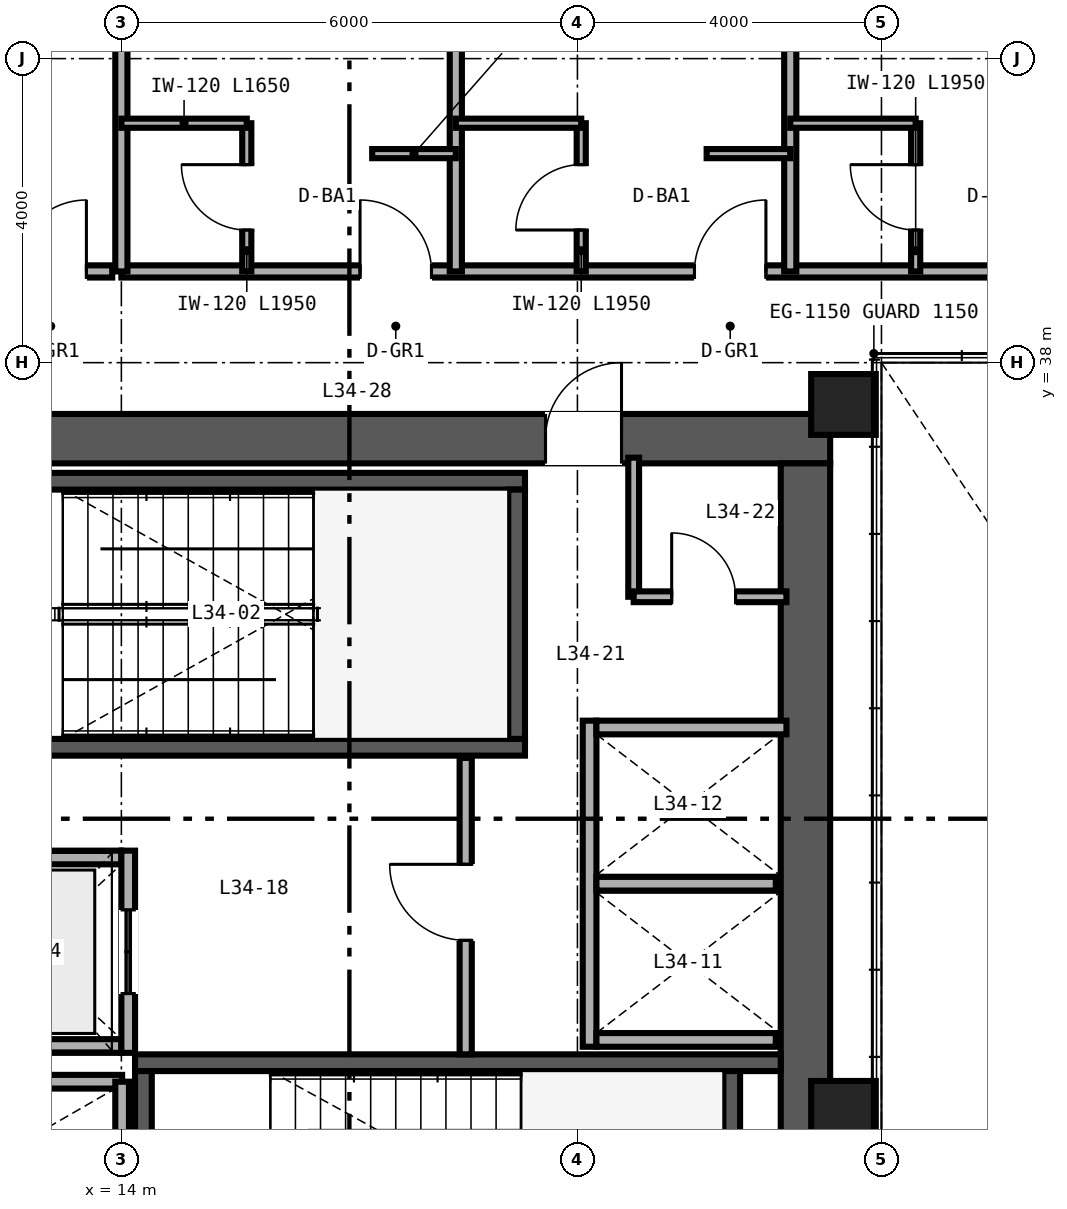
"""IFC4 building model, lengths in metres.
Left out: names, types, materials, properties, quantities, classifications, styles, units other than length and angle.
Written with IfcOpenShell. Run it as: python <this file> out.ifc"""

import sys

from ifc_helpers import new_model, si_unit, direction, frame, frame_2d, origin, origin_2d, place, context, subcontext, project, spatial, rectangle, hollow_rectangle, extrude, source, transform, mapped, element, fill, save


model = new_model("IFC4")
c1 = context("Model", 3, precision=1e-05, world=origin(), true_north=direction((0.0, 1.0)))
c2 = subcontext(c1, "Body", "Model", "MODEL_VIEW")
j1 = project(units=[si_unit("LENGTHUNIT", "METRE"), si_unit("PLANEANGLEUNIT", "RADIAN")], contexts=[c1])
p1 = place(None, origin())
s1 = spatial("IfcSite", under=j1, at=p1, CompositionType="ELEMENT")
p2 = place(p1, origin())
s2 = spatial("IfcBuilding", under=s1, at=p2, CompositionType="ELEMENT")
p3 = place(p2, frame((0.0, 0.0, 136.8)))
s3 = spatial("IfcBuildingStorey", under=s2, at=p3, CompositionType="ELEMENT", Elevation=136.8)
p4 = place(p3, frame((10.675, 37.0, 0.0), z_axis=(0.0, 0.0, 1.0), x_axis=(1.0, 0.0, 0.0)))
e1 = element("IfcWall", 1, at=p4, inside=s3, PredefinedType="SHEAR", context=c2, shape_type="SweptSolid", body=[
    extrude(rectangle(XDim=12.65, YDim=0.65, at=frame_2d((6.325, 0.0))), origin(), (0.0, 0.0, 1.0), 3.36),
])
p5 = place(p4, frame((8.905, 0.0, 0.0)))
e2 = element("IfcOpeningElement", 2, at=p5, cuts=e1, PredefinedType="OPENING", context=c2, shape_type="SweptSolid", body=[
    extrude(rectangle(XDim=1.0, YDim=2.15, at=frame_2d((0.5, 1.075))), frame((0.0, 0.335, 0.0), z_axis=(0.0, -1.0, 0.0), x_axis=(1.0, 0.0, 0.0)), (0.0, 0.0, 1.0), 0.67),
])
p6 = place(p3, frame((23.0, 15.325, 0.0), z_axis=(0.0, 0.0, 1.0), x_axis=(0.0, 1.0, 0.0)))
e3 = element("IfcWall", 3, at=p6, inside=s3, PredefinedType="SHEAR", context=c2, shape_type="SweptSolid", body=[
    extrude(rectangle(XDim=21.35, YDim=0.65, at=frame_2d((10.675, 0.0))), origin(), (0.0, 0.0, 1.0), 3.36),
])
p7 = place(p3, frame((11.325, 32.94, 0.0), z_axis=(0.0, 0.0, 1.0), x_axis=(1.0, 0.0, 0.0)))
e4 = element("IfcWall", 4, at=p7, inside=s3, PredefinedType="SHEAR", context=c2, shape_type="SweptSolid", body=[
    extrude(rectangle(XDim=7.985, YDim=0.22, at=frame_2d((3.993, 0.0))), origin(), (0.0, 0.0, 1.0), 3.4),
])
p8 = place(p7, frame((0.595, 0.0, 0.0)))
e5 = element("IfcOpeningElement", 5, at=p8, cuts=e4, PredefinedType="OPENING", context=c2, shape_type="SweptSolid", body=[
    extrude(rectangle(XDim=1.05, YDim=2.15, at=frame_2d((0.525, 1.075))), frame((0.0, 0.12, 0.0), z_axis=(0.0, -1.0, 0.0), x_axis=(1.0, 0.0, 0.0)), (0.0, 0.0, 1.0), 0.24),
])
p9 = place(p3, frame((11.325, 36.44, 0.0), z_axis=(0.0, 0.0, 1.0), x_axis=(1.0, 0.0, 0.0)))
e6 = element("IfcWall", 6, at=p9, inside=s3, PredefinedType="SHEAR", context=c2, shape_type="SweptSolid", body=[
    extrude(rectangle(XDim=7.985, YDim=0.22, at=frame_2d((3.993, 0.0))), origin(), (0.0, 0.0, 1.0), 3.4),
])
p10 = place(p3, frame((19.2, 33.05, 0.0), z_axis=(0.0, 0.0, 1.0), x_axis=(0.0, 1.0, 0.0)))
e7 = element("IfcWall", 7, at=p10, inside=s3, PredefinedType="SHEAR", context=c2, shape_type="SweptSolid", body=[
    extrude(rectangle(XDim=3.28, YDim=0.22, at=frame_2d((1.64, 0.0))), origin(), (0.0, 0.0, 1.0), 3.4),
])
p11 = place(p3, frame((14.18, 28.79, 0.0), z_axis=(0.0, 0.0, 1.0), x_axis=(1.0, 0.0, 0.0)))
e8 = element("IfcWall", 8, at=p11, inside=s3, PredefinedType="SHEAR", context=c2, shape_type="SweptSolid", body=[
    extrude(rectangle(XDim=8.495, YDim=0.22, at=frame_2d((4.248, 0.0))), origin(), (0.0, 0.0, 1.0), 3.4),
])
for number, where, z_axis, x_axis in (
    (9, (14.29, 25.4, 0.0), (0.0, 0.0, 1.0), (0.0, 1.0, 0.0)),
    (10, (22.03, 25.4, 0.0), (0.0, 0.0, 1.0), (0.0, 1.0, 0.0)),
):
    element("IfcWall", number, at=place(p3, frame(where, z_axis=z_axis, x_axis=x_axis)), inside=s3, PredefinedType="SHEAR", context=c2, shape_type="SweptSolid", body=[
        extrude(rectangle(XDim=3.28, YDim=0.22, at=frame_2d((1.64, 0.0))), origin(), (0.0, 0.0, 1.0), 3.4),
    ])
m1 = source(origin(), c2, "Body", "SweptSolid", [
    extrude(hollow_rectangle(XDim=0.85, YDim=0.8, WallThickness=0.032, at=origin_2d()), origin(), (0.0, 0.0, 1.0), 3.36),
])
for number, where, z_axis, x_axis in (
    (11, (23.5, 28.15, 0.0), (0.0, 0.0, 1.0), (1.0, 0.0, 0.0)),
    (12, (23.5, 37.45, 0.0), (0.0, 0.0, 1.0), (1.0, 0.0, 0.0)),
):
    element("IfcColumn", number, at=place(p3, frame(where, z_axis=z_axis, x_axis=x_axis)), inside=s3, PredefinedType="COLUMN", context=c2, shape_type="MappedRepresentation", body=[
        mapped(m1, transform((0.0, 0.0, 0.0), scale=1.0)),
    ])
p12 = place(p3, frame((20.16, 29.0, 0.0), z_axis=(0.0, 0.0, 1.0), x_axis=(0.0, 1.0, 0.0)))
e13 = element("IfcWall", 13, at=p12, inside=s3, PredefinedType="SOLIDWALL", context=c2, shape_type="SweptSolid", body=[
    extrude(rectangle(XDim=4.29, YDim=0.18, at=frame_2d((2.145, 0.0))), origin(), (0.0, 0.0, 1.0), 3.36),
])
p13 = place(p3, frame((20.25, 29.09, 0.0), z_axis=(0.0, 0.0, 1.0), x_axis=(1.0, 0.0, 0.0)))
e14 = element("IfcWall", 14, at=p13, inside=s3, PredefinedType="SOLIDWALL", context=c2, shape_type="SweptSolid", body=[
    extrude(rectangle(XDim=2.36, YDim=0.18, at=frame_2d((1.18, 0.0))), origin(), (0.0, 0.0, 1.0), 3.36),
])
p14 = place(p3, frame((20.25, 33.2, 0.0), z_axis=(0.0, 0.0, 1.0), x_axis=(1.0, 0.0, 0.0)))
e15 = element("IfcWall", 15, at=p14, inside=s3, PredefinedType="SOLIDWALL", context=c2, shape_type="SweptSolid", body=[
    extrude(rectangle(XDim=2.5, YDim=0.18, at=frame_2d((1.25, 0.0))), origin(), (0.0, 0.0, 1.0), 3.36),
])
p15 = place(p3, frame((20.25, 31.145, 0.0), z_axis=(0.0, 0.0, 1.0), x_axis=(1.0, 0.0, 0.0)))
e16 = element("IfcWall", 16, at=p15, inside=s3, PredefinedType="SOLIDWALL", context=c2, shape_type="SweptSolid", body=[
    extrude(rectangle(XDim=2.36, YDim=0.18, at=frame_2d((1.18, 0.0))), origin(), (0.0, 0.0, 1.0), 3.36),
])
for number, where, z_axis, x_axis in (
    (17, (11.5, 29.01, 0.0), (0.0, 0.0, 1.0), (1.0, 0.0, 0.0)),
    (18, (11.5, 31.49, 0.0), (0.0, 0.0, 1.0), (1.0, 0.0, 0.0)),
):
    element("IfcWall", number, at=place(p3, frame(where, z_axis=z_axis, x_axis=x_axis)), inside=s3, PredefinedType="SOLIDWALL", context=c2, shape_type="SweptSolid", body=[
        extrude(rectangle(XDim=2.5, YDim=0.18, at=frame_2d((1.25, 0.0))), origin(), (0.0, 0.0, 1.0), 3.36),
    ])
p16 = place(p3, frame((14.09, 28.92, 0.0), z_axis=(0.0, 0.0, 1.0), x_axis=(0.0, 1.0, 0.0)))
e19 = element("IfcWall", 19, at=p16, inside=s3, PredefinedType="SOLIDWALL", context=c2, shape_type="SweptSolid", body=[
    extrude(rectangle(XDim=2.66, YDim=0.18, at=frame_2d((1.33, 0.0))), origin(), (0.0, 0.0, 1.0), 3.36),
])
p17 = place(p16, frame((0.78, 0.0, 0.0)))
e20 = element("IfcOpeningElement", 20, at=p17, cuts=e19, PredefinedType="OPENING", context=c2, shape_type="SweptSolid", body=[
    extrude(rectangle(XDim=1.1, YDim=2.2, at=frame_2d((0.55, 1.1))), frame((0.0, 0.1, 0.0), z_axis=(0.0, -1.0, 0.0), x_axis=(1.0, 0.0, 0.0)), (0.0, 0.0, 1.0), 0.2),
])
p18 = place(p3, frame((11.5, 28.54, 0.0), z_axis=(0.0, 0.0, 1.0), x_axis=(1.0, 0.0, 0.0)))
e21 = element("IfcWall", 21, at=p18, inside=s3, PredefinedType="SOLIDWALL", context=c2, shape_type="SweptSolid", body=[
    extrude(rectangle(XDim=2.51, YDim=0.18, at=frame_2d((1.255, 0.0))), origin(), (0.0, 0.0, 1.0), 3.36),
])
p19 = place(p3, frame((14.01, 25.46, 0.0), z_axis=(0.0, 0.0, 1.0), x_axis=(0.0, 1.0, 0.0)))
e22 = element("IfcWall", 22, at=p19, inside=s3, PredefinedType="SOLIDWALL", context=c2, shape_type="SweptSolid", body=[
    extrude(rectangle(XDim=3.08, YDim=0.18, at=frame_2d((1.54, 0.0))), origin(), (0.0, 0.0, 1.0), 3.36),
])
p20 = place(p3, frame((18.53, 28.9, 0.0), z_axis=(0.0, 0.0, 1.0), x_axis=(0.0, 1.0, 0.0)))
e23 = element("IfcWall", 23, at=p20, inside=s3, PredefinedType="PARTITIONING", context=c2, shape_type="SweptSolid", body=[
    extrude(rectangle(XDim=3.9, YDim=0.16, at=frame_2d((1.95, 0.0))), origin(), (0.0, 0.0, 1.0), 3.36),
])
p21 = place(p20, frame((1.5, 0.0, 0.0)))
e24 = element("IfcOpeningElement", 24, at=p21, cuts=e23, PredefinedType="OPENING", context=c2, shape_type="SweptSolid", body=[
    extrude(rectangle(XDim=1.0, YDim=2.15, at=frame_2d((0.5, 1.075))), frame((0.0, 0.09, 0.0), z_axis=(0.0, -1.0, 0.0), x_axis=(1.0, 0.0, 0.0)), (0.0, 0.0, 1.0), 0.18),
])
p22 = place(p3, frame((20.74, 34.92, 0.0), z_axis=(0.0, 0.0, 1.0), x_axis=(0.0, 1.0, 0.0)))
e25 = element("IfcWall", 25, at=p22, inside=s3, PredefinedType="PARTITIONING", context=c2, shape_type="SweptSolid", body=[
    extrude(rectangle(XDim=1.83, YDim=0.142, at=frame_2d((0.915, 0.0))), origin(), (0.0, 0.0, 1.0), 3.36),
])
p23 = place(p3, frame((20.74, 34.92, 0.0), z_axis=(0.0, 0.0, 1.0), x_axis=(1.0, 0.0, 0.0)))
e26 = element("IfcWall", 26, at=p23, inside=s3, PredefinedType="PARTITIONING", context=c2, shape_type="SweptSolid", body=[
    extrude(rectangle(XDim=2.01, YDim=0.142, at=frame_2d((1.005, 0.0))), origin(), (0.0, 0.0, 1.0), 3.36),
])
p24 = place(p23, frame((0.5, 0.0, 0.0)))
e27 = element("IfcOpeningElement", 27, at=p24, cuts=e26, PredefinedType="OPENING", context=c2, shape_type="SweptSolid", body=[
    extrude(rectangle(XDim=0.84, YDim=2.1, at=frame_2d((0.42, 1.05))), frame((0.0, 0.081, 0.0), z_axis=(0.0, -1.0, 0.0), x_axis=(1.0, 0.0, 0.0)), (0.0, 0.0, 1.0), 0.162),
])
p25 = place(p3, frame((8.2, 39.2, 0.0), z_axis=(0.0, 0.0, 1.0), x_axis=(1.0, 0.0, 0.0)))
e28 = element("IfcWall", 28, at=p25, inside=s3, PredefinedType="PARTITIONING", context=c2, shape_type="SweptSolid", body=[
    extrude(rectangle(XDim=5.68, YDim=0.16, at=frame_2d((2.84, 0.0))), origin(), (0.0, 0.0, 1.0), 3.36),
])
p26 = place(p25, frame((4.4, 0.0, 0.0)))
e29 = element("IfcOpeningElement", 29, at=p26, cuts=e28, PredefinedType="OPENING", context=c2, shape_type="SweptSolid", body=[
    extrude(rectangle(XDim=0.94, YDim=2.15, at=frame_2d((0.47, 1.075))), frame((0.0, 0.09, 0.0), z_axis=(0.0, -1.0, 0.0), x_axis=(1.0, 0.0, 0.0)), (0.0, 0.0, 1.0), 0.18),
])
p27 = place(p3, frame((14.0, 39.2, 0.0), z_axis=(0.0, 0.0, 1.0), x_axis=(1.0, 0.0, 0.0)))
e30 = element("IfcWall", 30, at=p27, inside=s3, PredefinedType="PARTITIONING", context=c2, shape_type="SweptSolid", body=[
    extrude(rectangle(XDim=36.0, YDim=0.16, at=frame_2d((18.0, 0.0))), origin(), (0.0, 0.0, 1.0), 2.581),
])
p28 = place(p27, frame((3.14, 0.0, 0.0)))
e31 = element("IfcOpeningElement", 31, at=p28, cuts=e30, PredefinedType="OPENING", context=c2, shape_type="SweptSolid", body=[
    extrude(rectangle(XDim=0.94, YDim=2.15, at=frame_2d((0.47, 1.075))), frame((0.0, 0.09, 0.0), z_axis=(0.0, -1.0, 0.0), x_axis=(1.0, 0.0, 0.0)), (0.0, 0.0, 1.0), 0.18),
])
p29 = place(p27, frame((7.54, 0.0, 0.0)))
e32 = element("IfcOpeningElement", 32, at=p29, cuts=e30, PredefinedType="OPENING", context=c2, shape_type="SweptSolid", body=[
    extrude(rectangle(XDim=0.94, YDim=2.15, at=frame_2d((0.47, 1.075))), frame((0.0, 0.09, 0.0), z_axis=(0.0, -1.0, 0.0), x_axis=(1.0, 0.0, 0.0)), (0.0, 0.0, 1.0), 0.18),
])
p30 = place(p27, frame((11.94, 0.0, 0.0)))
e33 = element("IfcOpeningElement", 33, at=p30, cuts=e30, PredefinedType="OPENING", context=c2, shape_type="SweptSolid", body=[
    extrude(rectangle(XDim=0.94, YDim=2.15, at=frame_2d((0.47, 1.075))), frame((0.0, 0.09, 0.0), z_axis=(0.0, -1.0, 0.0), x_axis=(1.0, 0.0, 0.0)), (0.0, 0.0, 1.0), 0.18),
])
p31 = place(p27, frame((15.02, 0.0, 0.0)))
e34 = element("IfcOpeningElement", 34, at=p31, cuts=e30, PredefinedType="OPENING", context=c2, shape_type="SweptSolid", body=[
    extrude(rectangle(XDim=0.96, YDim=2.15, at=frame_2d((0.48, 1.075))), frame((0.0, 0.09, 0.0), z_axis=(0.0, -1.0, 0.0), x_axis=(1.0, 0.0, 0.0)), (0.0, 0.0, 1.0), 0.18),
])
p32 = place(p27, frame((21.14, 0.0, 0.0)))
e35 = element("IfcOpeningElement", 35, at=p32, cuts=e30, PredefinedType="OPENING", context=c2, shape_type="SweptSolid", body=[
    extrude(rectangle(XDim=0.94, YDim=2.15, at=frame_2d((0.47, 1.075))), frame((0.0, 0.09, 0.0), z_axis=(0.0, -1.0, 0.0), x_axis=(1.0, 0.0, 0.0)), (0.0, 0.0, 1.0), 0.18),
])
p33 = place(p27, frame((24.79, 0.0, 0.0)))
e36 = element("IfcOpeningElement", 36, at=p33, cuts=e30, PredefinedType="OPENING", context=c2, shape_type="SweptSolid", body=[
    extrude(rectangle(XDim=0.94, YDim=2.15, at=frame_2d((0.47, 1.075))), frame((0.0, 0.09, 0.0), z_axis=(0.0, -1.0, 0.0), x_axis=(1.0, 0.0, 0.0)), (0.0, 0.0, 1.0), 0.18),
])
p34 = place(p27, frame((30.24, 0.0, 0.0)))
e37 = element("IfcOpeningElement", 37, at=p34, cuts=e30, PredefinedType="OPENING", context=c2, shape_type="SweptSolid", body=[
    extrude(rectangle(XDim=0.94, YDim=2.15, at=frame_2d((0.47, 1.075))), frame((0.0, 0.09, 0.0), z_axis=(0.0, -1.0, 0.0), x_axis=(1.0, 0.0, 0.0)), (0.0, 0.0, 1.0), 0.18),
])
p35 = place(p27, frame((34.74, 0.0, 0.0)))
e38 = element("IfcOpeningElement", 38, at=p35, cuts=e30, PredefinedType="OPENING", context=c2, shape_type="SweptSolid", body=[
    extrude(rectangle(XDim=0.94, YDim=2.15, at=frame_2d((0.47, 1.075))), frame((0.0, 0.09, 0.0), z_axis=(0.0, -1.0, 0.0), x_axis=(1.0, 0.0, 0.0)), (0.0, 0.0, 1.0), 0.18),
])
for number, where, z_axis, x_axis in (
    (39, (14.0, 39.2, 0.0), (0.0, 0.0, 1.0), (0.0, 1.0, 0.0)),
    (40, (18.4, 39.2, 0.0), (0.0, 0.0, 1.0), (0.0, 1.0, 0.0)),
):
    element("IfcWall", number, at=place(p3, frame(where, z_axis=z_axis, x_axis=x_axis)), inside=s3, PredefinedType="PARTITIONING", context=c2, shape_type="SweptSolid", body=[
        extrude(rectangle(XDim=10.44, YDim=0.16, at=frame_2d((5.22, 0.0))), origin(), (0.0, 0.0, 1.0), 2.667),
    ])
p36 = place(p3, frame((15.65, 39.2, 0.0), z_axis=(0.0, 0.0, 1.0), x_axis=(0.0, 1.0, 0.0)))
e41 = element("IfcWall", 41, at=p36, inside=s3, PredefinedType="PARTITIONING", context=c2, shape_type="SweptSolid", body=[
    extrude(rectangle(XDim=1.95, YDim=0.12, at=frame_2d((0.975, 0.0))), origin(), (0.0, 0.0, 1.0), 3.36),
])
p37 = place(p36, frame((0.545, 0.0, 0.0)))
e42 = element("IfcOpeningElement", 42, at=p37, cuts=e41, PredefinedType="OPENING", context=c2, shape_type="SweptSolid", body=[
    extrude(rectangle(XDim=0.86, YDim=2.1, at=frame_2d((0.43, 1.05))), frame((0.0, 0.07, 0.0), z_axis=(0.0, -1.0, 0.0), x_axis=(1.0, 0.0, 0.0)), (0.0, 0.0, 1.0), 0.14),
])
p38 = place(p3, frame((14.0, 41.15, 0.0), z_axis=(0.0, 0.0, 1.0), x_axis=(1.0, 0.0, 0.0)))
e43 = element("IfcWall", 43, at=p38, inside=s3, PredefinedType="PARTITIONING", context=c2, shape_type="SweptSolid", body=[
    extrude(rectangle(XDim=1.65, YDim=0.12, at=frame_2d((0.825, 0.0))), origin(), (0.0, 0.0, 1.0), 3.36),
])
p39 = place(p3, frame((17.3, 40.75, 0.0), z_axis=(0.0, 0.0, 1.0), x_axis=(1.0, 0.0, 0.0)))
e44 = element("IfcWall", 44, at=p39, inside=s3, PredefinedType="PARTITIONING", context=c2, shape_type="SweptSolid", body=[
    extrude(rectangle(XDim=1.1, YDim=0.12, at=frame_2d((0.55, 0.0))), origin(), (0.0, 0.0, 1.0), 3.36),
])
p40 = place(p3, frame((22.8, 39.2, 0.0), z_axis=(0.0, 0.0, 1.0), x_axis=(0.0, 1.0, 0.0)))
e45 = element("IfcWall", 45, at=p40, inside=s3, PredefinedType="PARTITIONING", context=c2, shape_type="SweptSolid", body=[
    extrude(rectangle(XDim=10.44, YDim=0.16, at=frame_2d((5.22, 0.0))), origin(), (0.0, 0.0, 1.0), 2.823),
])
p41 = place(p3, frame((20.05, 39.2, 0.0), z_axis=(0.0, 0.0, 1.0), x_axis=(0.0, 1.0, 0.0)))
e46 = element("IfcWall", 46, at=p41, inside=s3, PredefinedType="PARTITIONING", context=c2, shape_type="SweptSolid", body=[
    extrude(rectangle(XDim=1.95, YDim=0.12, at=frame_2d((0.975, 0.0))), origin(), (0.0, 0.0, 1.0), 3.36),
])
p42 = place(p41, frame((0.545, 0.0, 0.0)))
e47 = element("IfcOpeningElement", 47, at=p42, cuts=e46, PredefinedType="OPENING", context=c2, shape_type="SweptSolid", body=[
    extrude(rectangle(XDim=0.86, YDim=2.1, at=frame_2d((0.43, 1.05))), frame((0.0, 0.07, 0.0), z_axis=(0.0, -1.0, 0.0), x_axis=(1.0, 0.0, 0.0)), (0.0, 0.0, 1.0), 0.14),
])
p43 = place(p3, frame((18.4, 41.15, 0.0), z_axis=(0.0, 0.0, 1.0), x_axis=(1.0, 0.0, 0.0)))
e48 = element("IfcWall", 48, at=p43, inside=s3, PredefinedType="PARTITIONING", context=c2, shape_type="SweptSolid", body=[
    extrude(rectangle(XDim=1.65, YDim=0.12, at=frame_2d((0.825, 0.0))), origin(), (0.0, 0.0, 1.0), 3.36),
])
p44 = place(p3, frame((21.7, 40.75, 0.0), z_axis=(0.0, 0.0, 1.0), x_axis=(1.0, 0.0, 0.0)))
e49 = element("IfcWall", 49, at=p44, inside=s3, PredefinedType="PARTITIONING", context=c2, shape_type="SweptSolid", body=[
    extrude(rectangle(XDim=1.1, YDim=0.12, at=frame_2d((0.55, 0.0))), origin(), (0.0, 0.0, 1.0), 3.36),
])
p45 = place(p3, frame((24.45, 39.2, 0.0), z_axis=(0.0, 0.0, 1.0), x_axis=(0.0, 1.0, 0.0)))
e50 = element("IfcWall", 50, at=p45, inside=s3, PredefinedType="PARTITIONING", context=c2, shape_type="SweptSolid", body=[
    extrude(rectangle(XDim=1.95, YDim=0.12, at=frame_2d((0.975, 0.0))), origin(), (0.0, 0.0, 1.0), 3.36),
])
p46 = place(p45, frame((0.545, 0.0, 0.0)))
e51 = element("IfcOpeningElement", 51, at=p46, cuts=e50, PredefinedType="OPENING", context=c2, shape_type="SweptSolid", body=[
    extrude(rectangle(XDim=0.86, YDim=2.1, at=frame_2d((0.43, 1.05))), frame((0.0, 0.07, 0.0), z_axis=(0.0, -1.0, 0.0), x_axis=(1.0, 0.0, 0.0)), (0.0, 0.0, 1.0), 0.14),
])
p47 = place(p3, frame((22.8, 41.15, 0.0), z_axis=(0.0, 0.0, 1.0), x_axis=(1.0, 0.0, 0.0)))
e52 = element("IfcWall", 52, at=p47, inside=s3, PredefinedType="PARTITIONING", context=c2, shape_type="SweptSolid", body=[
    extrude(rectangle(XDim=1.65, YDim=0.12, at=frame_2d((0.825, 0.0))), origin(), (0.0, 0.0, 1.0), 2.581),
])
m2 = source(origin(), c2, "Body", "SweptSolid", [
    extrude(rectangle(XDim=1.1, YDim=2.2, at=frame_2d((0.55, 1.1))), frame((0.0, 0.025, 0.0), z_axis=(0.0, -1.0, 0.0), x_axis=(1.0, 0.0, 0.0)), (0.0, 0.0, 1.0), 0.05),
])
p48 = place(p17, origin())
e53 = element("IfcDoor", 53, at=p48, inside=s3, OperationType="DOUBLE_DOOR_SLIDING", PredefinedType="DOOR", context=c2, shape_type="MappedRepresentation", body=[
    mapped(m2, transform((0.0, 0.0, 0.0), scale=1.0)),
])
fill(e20, e53)
m3 = source(origin(), c2, "Body", "SweptSolid", [
    extrude(rectangle(XDim=1.0, YDim=2.15, at=frame_2d((0.5, 1.075))), frame((0.0, 0.025, 0.0), z_axis=(0.0, -1.0, 0.0), x_axis=(1.0, 0.0, 0.0)), (0.0, 0.0, 1.0), 0.05),
])
p49 = place(p21, origin())
e54 = element("IfcDoor", 54, at=p49, inside=s3, OperationType="SINGLE_SWING_RIGHT", PredefinedType="DOOR", context=c2, shape_type="MappedRepresentation", body=[
    mapped(m3, transform((0.0, 0.0, 0.0), scale=1.0)),
])
fill(e24, e54)
m4 = source(origin(), c2, "Body", "SweptSolid", [
    extrude(rectangle(XDim=0.84, YDim=2.1, at=frame_2d((0.42, 1.05))), frame((0.0, 0.025, 0.0), z_axis=(0.0, -1.0, 0.0), x_axis=(1.0, 0.0, 0.0)), (0.0, 0.0, 1.0), 0.05),
])
p50 = place(p24, origin())
e55 = element("IfcDoor", 55, at=p50, inside=s3, OperationType="SINGLE_SWING_LEFT", PredefinedType="DOOR", context=c2, shape_type="MappedRepresentation", body=[
    mapped(m4, transform((0.0, 0.0, 0.0), scale=1.0)),
])
fill(e27, e55)
p51 = place(p5, origin())
e56 = element("IfcDoor", 56, at=p51, inside=s3, OperationType="SINGLE_SWING_RIGHT", PredefinedType="DOOR", context=c2, shape_type="MappedRepresentation", body=[
    mapped(m3, transform((0.0, 0.0, 0.0), scale=1.0)),
])
fill(e2, e56)
m5 = source(origin(), c2, "Body", "SweptSolid", [
    extrude(rectangle(XDim=0.94, YDim=2.15, at=frame_2d((0.47, 1.075))), frame((0.0, 0.025, 0.0), z_axis=(0.0, -1.0, 0.0), x_axis=(1.0, 0.0, 0.0)), (0.0, 0.0, 1.0), 0.05),
])
p52 = place(p26, origin())
e57 = element("IfcDoor", 57, at=p52, inside=s3, OperationType="SINGLE_SWING_RIGHT", PredefinedType="DOOR", context=c2, shape_type="MappedRepresentation", body=[
    mapped(m5, transform((0.0, 0.0, 0.0), scale=1.0)),
])
fill(e29, e57)
m6 = source(origin(), c2, "Body", "SweptSolid", [
    extrude(rectangle(XDim=0.86, YDim=2.1, at=frame_2d((0.43, 1.05))), frame((0.0, 0.025, 0.0), z_axis=(0.0, -1.0, 0.0), x_axis=(1.0, 0.0, 0.0)), (0.0, 0.0, 1.0), 0.05),
])
p53 = place(p37, origin())
e58 = element("IfcDoor", 58, at=p53, inside=s3, OperationType="SINGLE_SWING_RIGHT", PredefinedType="DOOR", context=c2, shape_type="MappedRepresentation", body=[
    mapped(m6, transform((0.0, 0.0, 0.0), scale=1.0)),
])
fill(e42, e58)
p54 = place(p42, origin())
e59 = element("IfcDoor", 59, at=p54, inside=s3, OperationType="SINGLE_SWING_LEFT", PredefinedType="DOOR", context=c2, shape_type="MappedRepresentation", body=[
    mapped(m6, transform((0.0, 0.0, 0.0), scale=1.0)),
])
fill(e47, e59)
p55 = place(p46, origin())
e60 = element("IfcDoor", 60, at=p55, inside=s3, OperationType="SINGLE_SWING_RIGHT", PredefinedType="DOOR", context=c2, shape_type="MappedRepresentation", body=[
    mapped(m6, transform((0.0, 0.0, 0.0), scale=1.0)),
])
fill(e51, e60)
p56 = place(p28, origin())
e61 = element("IfcDoor", 61, at=p56, inside=s3, OperationType="SINGLE_SWING_LEFT", PredefinedType="DOOR", context=c2, shape_type="MappedRepresentation", body=[
    mapped(m5, transform((0.0, 0.0, 0.0), scale=1.0)),
])
fill(e31, e61)
p57 = place(p29, origin())
e62 = element("IfcDoor", 62, at=p57, inside=s3, OperationType="SINGLE_SWING_RIGHT", PredefinedType="DOOR", context=c2, shape_type="MappedRepresentation", body=[
    mapped(m5, transform((0.0, 0.0, 0.0), scale=1.0)),
])
fill(e32, e62)
save(model, sys.argv[1])
